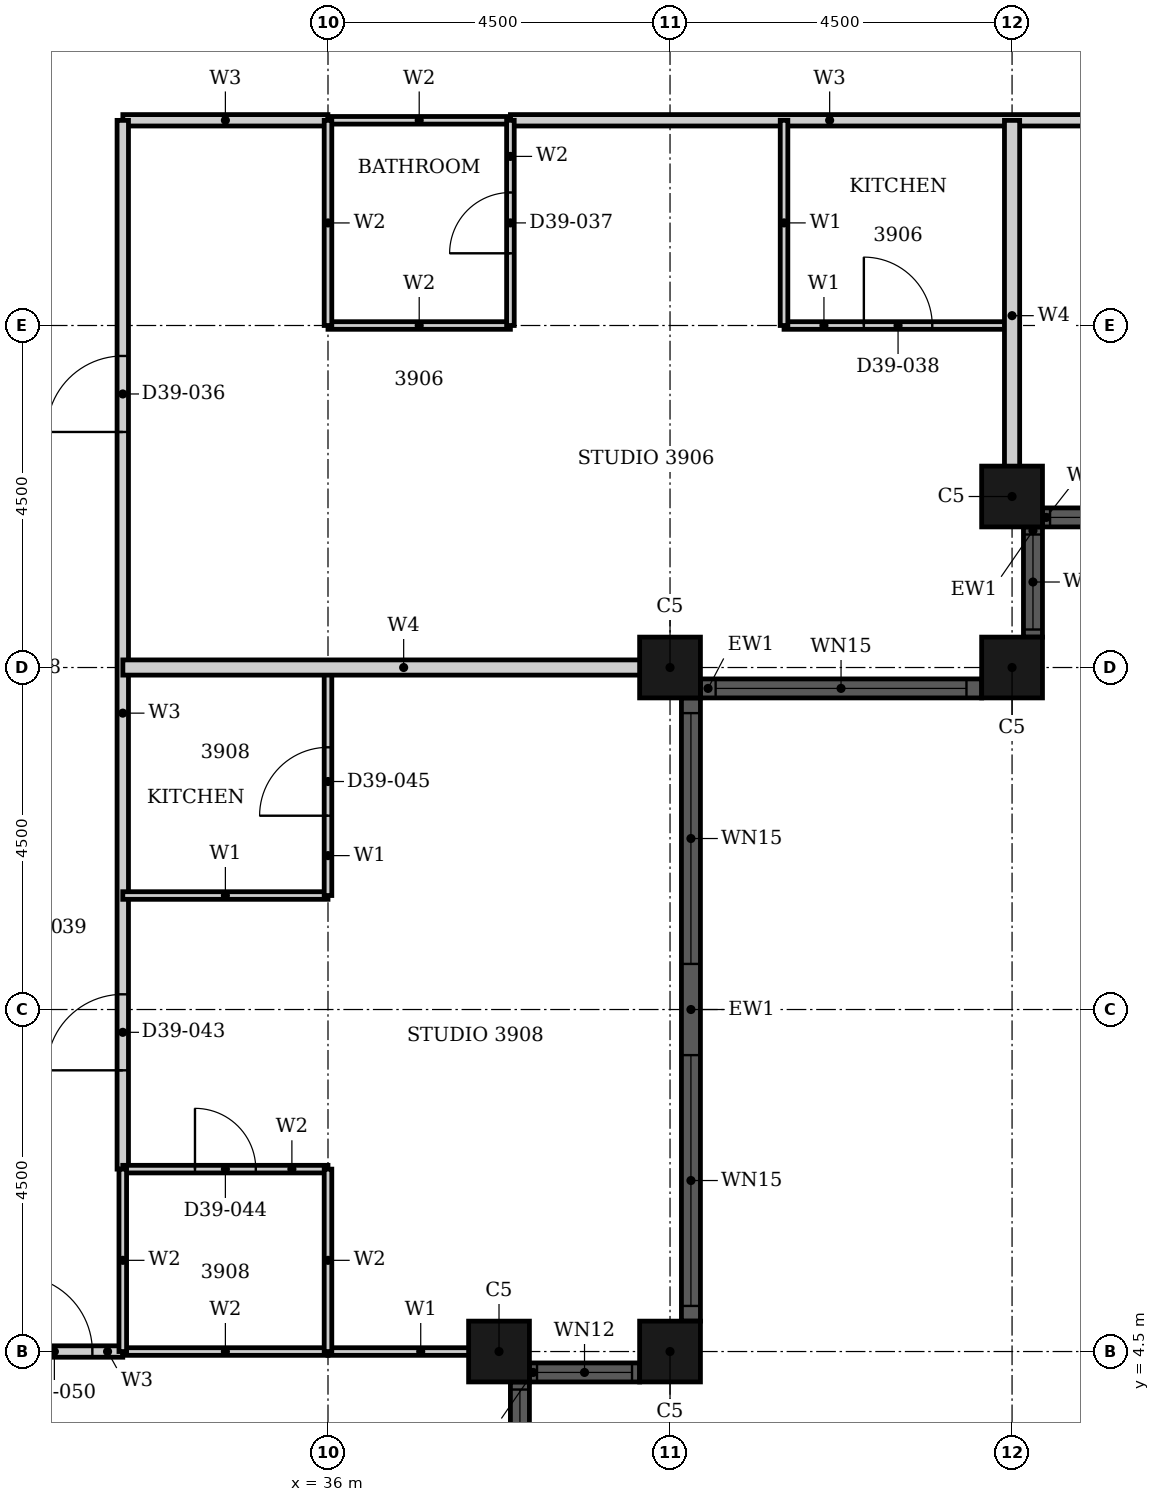
"""IFC4 building model, lengths in metres.
Left out: names, types, materials, properties, quantities, classifications, styles, units other than length and angle.
Written with IfcOpenShell. Run it as: python <this file> out.ifc"""

import sys

from ifc_helpers import new_model, si_unit, direction, frame, frame_2d, origin, origin_2d, place, context, subcontext, project, spatial, rectangle, hollow_rectangle, extrude, element, fill, save


model = new_model("IFC4")
c1 = context("Model", 3, precision=1e-05, world=origin(), true_north=direction((0.0, 1.0)))
c2 = subcontext(c1, "Body", "Model", "MODEL_VIEW")
j1 = project(units=[si_unit("LENGTHUNIT", "METRE"), si_unit("PLANEANGLEUNIT", "RADIAN")], contexts=[c1])
p1 = place(None, origin())
s1 = spatial("IfcSite", under=j1, at=p1, CompositionType="ELEMENT")
p2 = place(p1, origin())
s2 = spatial("IfcBuilding", under=s1, at=p2, CompositionType="ELEMENT")
p3 = place(p2, frame((0.0, 0.0, 158.0)))
s3 = spatial("IfcBuildingStorey", under=s2, at=p3, CompositionType="ELEMENT", Elevation=158.0)
for number, where, z_axis, x_axis in (
    (1, (38.25, 4.5, 0.0), (0.0, 0.0, 1.0), (1.0, 0.0, 0.0)),
    (2, (40.5, 4.5, 0.0), (0.0, 0.0, 1.0), (1.0, 0.0, 0.0)),
    (3, (40.5, 13.5, 0.0), (0.0, 0.0, 1.0), (1.0, 0.0, 0.0)),
    (4, (45.0, 13.5, 0.0), (0.0, 0.0, 1.0), (1.0, 0.0, 0.0)),
    (5, (45.0, 15.75, 0.0), (0.0, 0.0, 1.0), (1.0, 0.0, 0.0)),
):
    element("IfcColumn", number, at=place(p3, frame(where, z_axis=z_axis, x_axis=x_axis)), inside=s3, PredefinedType="COLUMN", context=c2, shape_type="SweptSolid", body=[
        extrude(hollow_rectangle(XDim=0.8, YDim=0.8, WallThickness=0.025, at=origin_2d()), origin(), (0.0, 0.0, 1.0), 3.7),
    ])
p4 = place(p3, frame((38.525, 2.65, 0.0), z_axis=(0.0, 0.0, 1.0), x_axis=(0.0, 1.0, 0.0)))
e6 = element("IfcWall", 6, at=p4, inside=s3, PredefinedType="SOLIDWALL", context=c2, shape_type="SweptSolid", body=[
    extrude(rectangle(XDim=1.45, YDim=0.25, at=frame_2d((0.725, 0.0))), origin(), (0.0, 0.0, 1.0), 3.7),
])
p5 = place(p4, frame((0.1, 0.0, 0.9)))
e7 = element("IfcOpeningElement", 7, at=p5, cuts=e6, PredefinedType="OPENING", context=c2, shape_type="SweptSolid", body=[
    extrude(rectangle(XDim=1.25, YDim=1.85, at=frame_2d((0.625, 0.925))), frame((0.0, 0.135, 0.0), z_axis=(0.0, -1.0, 0.0), x_axis=(1.0, 0.0, 0.0)), (0.0, 0.0, 1.0), 0.27),
])
p6 = place(p3, frame((38.65, 4.225, 0.0), z_axis=(0.0, 0.0, 1.0), x_axis=(1.0, 0.0, 0.0)))
e8 = element("IfcWall", 8, at=p6, inside=s3, PredefinedType="SOLIDWALL", context=c2, shape_type="SweptSolid", body=[
    extrude(rectangle(XDim=1.45, YDim=0.25, at=frame_2d((0.725, 0.0))), origin(), (0.0, 0.0, 1.0), 3.7),
])
p7 = place(p6, frame((0.1, 0.0, 0.9)))
e9 = element("IfcOpeningElement", 9, at=p7, cuts=e8, PredefinedType="OPENING", context=c2, shape_type="SweptSolid", body=[
    extrude(rectangle(XDim=1.25, YDim=2.08, at=frame_2d((0.625, 1.04))), frame((0.0, 0.135, 0.0), z_axis=(0.0, -1.0, 0.0), x_axis=(1.0, 0.0, 0.0)), (0.0, 0.0, 1.0), 0.27),
])
p8 = place(p3, frame((40.775, 4.9, 0.0), z_axis=(0.0, 0.0, 1.0), x_axis=(0.0, 1.0, 0.0)))
e10 = element("IfcWall", 10, at=p8, inside=s3, PredefinedType="SOLIDWALL", context=c2, shape_type="SweptSolid", body=[
    extrude(rectangle(XDim=8.2, YDim=0.25, at=frame_2d((4.1, 0.0))), origin(), (0.0, 0.0, 1.0), 3.7),
])
p9 = place(p8, frame((0.2, 0.0, 0.45)))
e11 = element("IfcOpeningElement", 11, at=p9, cuts=e10, PredefinedType="OPENING", context=c2, shape_type="SweptSolid", body=[
    extrude(rectangle(XDim=3.3, YDim=2.3, at=frame_2d((1.65, 1.15))), frame((0.0, 0.135, 0.0), z_axis=(0.0, -1.0, 0.0), x_axis=(1.0, 0.0, 0.0)), (0.0, 0.0, 1.0), 0.27),
])
p10 = place(p8, frame((4.7, 0.0, 0.45)))
e12 = element("IfcOpeningElement", 12, at=p10, cuts=e10, PredefinedType="OPENING", context=c2, shape_type="SweptSolid", body=[
    extrude(rectangle(XDim=3.3, YDim=2.3, at=frame_2d((1.65, 1.15))), frame((0.0, 0.135, 0.0), z_axis=(0.0, -1.0, 0.0), x_axis=(1.0, 0.0, 0.0)), (0.0, 0.0, 1.0), 0.27),
])
p11 = place(p3, frame((40.9, 13.225, 0.0), z_axis=(0.0, 0.0, 1.0), x_axis=(1.0, 0.0, 0.0)))
e13 = element("IfcWall", 13, at=p11, inside=s3, PredefinedType="SOLIDWALL", context=c2, shape_type="SweptSolid", body=[
    extrude(rectangle(XDim=3.7, YDim=0.25, at=frame_2d((1.85, 0.0))), origin(), (0.0, 0.0, 1.0), 3.7),
])
p12 = place(p11, frame((0.2, 0.0, 0.45)))
e14 = element("IfcOpeningElement", 14, at=p12, cuts=e13, PredefinedType="OPENING", context=c2, shape_type="SweptSolid", body=[
    extrude(rectangle(XDim=3.3, YDim=2.3, at=frame_2d((1.65, 1.15))), frame((0.0, 0.135, 0.0), z_axis=(0.0, -1.0, 0.0), x_axis=(1.0, 0.0, 0.0)), (0.0, 0.0, 1.0), 0.27),
])
p13 = place(p3, frame((45.275, 13.9, 0.0), z_axis=(0.0, 0.0, 1.0), x_axis=(0.0, 1.0, 0.0)))
e15 = element("IfcWall", 15, at=p13, inside=s3, PredefinedType="SOLIDWALL", context=c2, shape_type="SweptSolid", body=[
    extrude(rectangle(XDim=1.45, YDim=0.25, at=frame_2d((0.725, 0.0))), origin(), (0.0, 0.0, 1.0), 3.7),
])
p14 = place(p13, frame((0.1, 0.0, 0.9)))
e16 = element("IfcOpeningElement", 16, at=p14, cuts=e15, PredefinedType="OPENING", context=c2, shape_type="SweptSolid", body=[
    extrude(rectangle(XDim=1.25, YDim=1.85, at=frame_2d((0.625, 0.925))), frame((0.0, 0.135, 0.0), z_axis=(0.0, -1.0, 0.0), x_axis=(1.0, 0.0, 0.0)), (0.0, 0.0, 1.0), 0.27),
])
p15 = place(p3, frame((45.4, 15.475, 0.0), z_axis=(0.0, 0.0, 1.0), x_axis=(1.0, 0.0, 0.0)))
e17 = element("IfcWall", 17, at=p15, inside=s3, PredefinedType="SOLIDWALL", context=c2, shape_type="SweptSolid", body=[
    extrude(rectangle(XDim=1.45, YDim=0.25, at=frame_2d((0.725, 0.0))), origin(), (0.0, 0.0, 1.0), 3.7),
])
p16 = place(p15, frame((0.1, 0.0, 0.9)))
e18 = element("IfcOpeningElement", 18, at=p16, cuts=e17, PredefinedType="OPENING", context=c2, shape_type="SweptSolid", body=[
    extrude(rectangle(XDim=1.25, YDim=1.85, at=frame_2d((0.625, 0.925))), frame((0.0, 0.135, 0.0), z_axis=(0.0, -1.0, 0.0), x_axis=(1.0, 0.0, 0.0)), (0.0, 0.0, 1.0), 0.27),
])
p17 = place(p3, frame((33.301, 20.7, 0.0), z_axis=(0.0, 0.0, 1.0), x_axis=(1.0, 0.0, 0.0)))
e19 = element("IfcWall", 19, at=p17, inside=s3, PredefinedType="PARTITIONING", context=c2, shape_type="SweptSolid", body=[
    extrude(rectangle(XDim=2.698, YDim=0.15, at=frame_2d((1.349, 0.0))), origin(), (0.0, 0.0, 1.0), 3.4),
])
p18 = place(p3, frame((38.4, 20.7, 0.0), z_axis=(0.0, 0.0, 1.0), x_axis=(1.0, 0.0, 0.0)))
e20 = element("IfcWall", 20, at=p18, inside=s3, PredefinedType="PARTITIONING", context=c2, shape_type="SweptSolid", body=[
    extrude(rectangle(XDim=8.4, YDim=0.15, at=frame_2d((4.2, 0.0))), origin(), (0.0, 0.0, 1.0), 3.4),
])
p19 = place(p3, frame((31.5, 4.5, 0.0), z_axis=(0.0, 0.0, 1.0), x_axis=(1.0, 0.0, 0.0)))
e21 = element("IfcWall", 21, at=p19, inside=s3, PredefinedType="PARTITIONING", context=c2, shape_type="SweptSolid", body=[
    extrude(rectangle(XDim=1.8, YDim=0.15, at=frame_2d((0.9, 0.0))), origin(), (0.0, 0.0, 1.0), 3.4),
])
p20 = place(p19, frame((0.4, 0.0, 0.0)))
e22 = element("IfcOpeningElement", 22, at=p20, cuts=e21, PredefinedType="OPENING", context=c2, shape_type="SweptSolid", body=[
    extrude(rectangle(XDim=1.0, YDim=2.1, at=frame_2d((0.5, 1.05))), frame((0.0, 0.085, 0.0), z_axis=(0.0, -1.0, 0.0), x_axis=(1.0, 0.0, 0.0)), (0.0, 0.0, 1.0), 0.17),
])
p21 = place(p3, frame((33.3, 6.9, 0.0), z_axis=(0.0, 0.0, 1.0), x_axis=(0.0, 1.0, 0.0)))
e23 = element("IfcWall", 23, at=p21, inside=s3, PredefinedType="PARTITIONING", context=c2, shape_type="SweptSolid", body=[
    extrude(rectangle(XDim=13.799, YDim=0.15, at=frame_2d((6.899, 0.0))), origin(), (0.0, 0.0, 1.0), 3.4),
])
p22 = place(p21, frame((9.699, 0.0, 0.0)))
e24 = element("IfcOpeningElement", 24, at=p22, cuts=e23, PredefinedType="OPENING", context=c2, shape_type="SweptSolid", body=[
    extrude(rectangle(XDim=1.0, YDim=2.2, at=frame_2d((0.5, 1.1))), frame((0.0, 0.085, 0.0), z_axis=(0.0, -1.0, 0.0), x_axis=(1.0, 0.0, 0.0)), (0.0, 0.0, 1.0), 0.17),
])
p23 = place(p21, frame((1.3, 0.0, 0.0)))
e25 = element("IfcOpeningElement", 25, at=p23, cuts=e23, PredefinedType="OPENING", context=c2, shape_type="SweptSolid", body=[
    extrude(rectangle(XDim=1.0, YDim=2.2, at=frame_2d((0.5, 1.1))), frame((0.0, 0.085, 0.0), z_axis=(0.0, -1.0, 0.0), x_axis=(1.0, 0.0, 0.0)), (0.0, 0.0, 1.0), 0.17),
])
p24 = place(p3, frame((33.3, 10.5, 0.0), z_axis=(0.0, 0.0, 1.0), x_axis=(1.0, 0.0, 0.0)))
e26 = element("IfcWall", 26, at=p24, inside=s3, PredefinedType="PARTITIONING", context=c2, shape_type="SweptSolid", body=[
    extrude(rectangle(XDim=2.7, YDim=0.1, at=frame_2d((1.35, 0.0))), origin(), (0.0, 0.0, 1.0), 3.4),
])
p25 = place(p3, frame((42.0, 18.0, 0.0), z_axis=(0.0, 0.0, 1.0), x_axis=(1.0, 0.0, 0.0)))
e27 = element("IfcWall", 27, at=p25, inside=s3, PredefinedType="PARTITIONING", context=c2, shape_type="SweptSolid", body=[
    extrude(rectangle(XDim=3.0, YDim=0.1, at=frame_2d((1.5, 0.0))), origin(), (0.0, 0.0, 1.0), 3.4),
])
p26 = place(p25, frame((1.05, 0.0, 0.0)))
e28 = element("IfcOpeningElement", 28, at=p26, cuts=e27, PredefinedType="OPENING", context=c2, shape_type="SweptSolid", body=[
    extrude(rectangle(XDim=0.9, YDim=2.1, at=frame_2d((0.45, 1.05))), frame((0.0, 0.06, 0.0), z_axis=(0.0, -1.0, 0.0), x_axis=(1.0, 0.0, 0.0)), (0.0, 0.0, 1.0), 0.12),
])
p27 = place(p3, frame((36.0, 4.5, 0.0), z_axis=(0.0, 0.0, 1.0), x_axis=(1.0, 0.0, 0.0)))
e29 = element("IfcWall", 29, at=p27, inside=s3, PredefinedType="PARTITIONING", context=c2, shape_type="SweptSolid", body=[
    extrude(rectangle(XDim=2.44, YDim=0.1, at=frame_2d((1.22, 0.0))), origin(), (0.0, 0.0, 1.0), 3.4),
])
p28 = place(p3, frame((36.0, 10.5, 0.0), z_axis=(0.0, 0.0, 1.0), x_axis=(0.0, 1.0, 0.0)))
e30 = element("IfcWall", 30, at=p28, inside=s3, PredefinedType="PARTITIONING", context=c2, shape_type="SweptSolid", body=[
    extrude(rectangle(XDim=3.0, YDim=0.1, at=frame_2d((1.5, 0.0))), origin(), (0.0, 0.0, 1.0), 2.68),
])
p29 = place(p28, frame((1.05, 0.0, 0.0)))
e31 = element("IfcOpeningElement", 31, at=p29, cuts=e30, PredefinedType="OPENING", context=c2, shape_type="SweptSolid", body=[
    extrude(rectangle(XDim=0.9, YDim=2.1, at=frame_2d((0.45, 1.05))), frame((0.0, 0.06, 0.0), z_axis=(0.0, -1.0, 0.0), x_axis=(1.0, 0.0, 0.0)), (0.0, 0.0, 1.0), 0.12),
])
p30 = place(p3, frame((42.0, 18.0, 0.0), z_axis=(0.0, 0.0, 1.0), x_axis=(0.0, 1.0, 0.0)))
e32 = element("IfcWall", 32, at=p30, inside=s3, PredefinedType="PARTITIONING", context=c2, shape_type="SweptSolid", body=[
    extrude(rectangle(XDim=2.7, YDim=0.1, at=frame_2d((1.35, 0.0))), origin(), (0.0, 0.0, 1.0), 3.4),
])
p31 = place(p3, frame((33.301, 13.5, 0.0), z_axis=(0.0, 0.0, 1.0), x_axis=(1.0, 0.0, 0.0)))
e33 = element("IfcWall", 33, at=p31, inside=s3, PredefinedType="PARTITIONING", context=c2, shape_type="SweptSolid", body=[
    extrude(rectangle(XDim=7.389, YDim=0.2, at=frame_2d((3.694, 0.0))), origin(), (0.0, 0.0, 1.0), 2.48),
])
p32 = place(p3, frame((45.0, 15.56, 0.0), z_axis=(0.0, 0.0, 1.0), x_axis=(0.0, 1.0, 0.0)))
e34 = element("IfcWall", 34, at=p32, inside=s3, PredefinedType="PARTITIONING", context=c2, shape_type="SweptSolid", body=[
    extrude(rectangle(XDim=5.139, YDim=0.2, at=frame_2d((2.569, 0.0))), origin(), (0.0, 0.0, 1.0), 3.4),
])
for number, where, z_axis, x_axis in (
    (35, (36.0, 18.0, 0.0), (0.0, 0.0, 1.0), (1.0, 0.0, 0.0)),
    (36, (36.0, 20.7, 0.0), (0.0, 0.0, 1.0), (1.0, 0.0, 0.0)),
):
    element("IfcWall", number, at=place(p3, frame(where, z_axis=z_axis, x_axis=x_axis)), inside=s3, PredefinedType="PARTITIONING", context=c2, shape_type="SweptSolid", body=[
        extrude(rectangle(XDim=2.4, YDim=0.1, at=frame_2d((1.2, 0.0))), origin(), (0.0, 0.0, 1.0), 3.4),
    ])
p33 = place(p3, frame((33.3, 4.5, 0.0), z_axis=(0.0, 0.0, 1.0), x_axis=(1.0, 0.0, 0.0)))
e37 = element("IfcWall", 37, at=p33, inside=s3, PredefinedType="PARTITIONING", context=c2, shape_type="SweptSolid", body=[
    extrude(rectangle(XDim=2.7, YDim=0.1, at=frame_2d((1.35, 0.0))), origin(), (0.0, 0.0, 1.0), 3.4),
])
p34 = place(p3, frame((33.3, 6.9, 0.0), z_axis=(0.0, 0.0, 1.0), x_axis=(1.0, 0.0, 0.0)))
e38 = element("IfcWall", 38, at=p34, inside=s3, PredefinedType="PARTITIONING", context=c2, shape_type="SweptSolid", body=[
    extrude(rectangle(XDim=2.7, YDim=0.1, at=frame_2d((1.35, 0.0))), origin(), (0.0, 0.0, 1.0), 3.4),
])
p35 = place(p34, frame((0.95, 0.0, 0.0)))
e39 = element("IfcOpeningElement", 39, at=p35, cuts=e38, PredefinedType="OPENING", context=c2, shape_type="SweptSolid", body=[
    extrude(rectangle(XDim=0.8, YDim=2.1, at=frame_2d((0.4, 1.05))), frame((0.0, 0.06, 0.0), z_axis=(0.0, -1.0, 0.0), x_axis=(1.0, 0.0, 0.0)), (0.0, 0.0, 1.0), 0.12),
])
p36 = place(p3, frame((33.3, 4.5, 0.0), z_axis=(0.0, 0.0, 1.0), x_axis=(0.0, 1.0, 0.0)))
e40 = element("IfcWall", 40, at=p36, inside=s3, PredefinedType="PARTITIONING", context=c2, shape_type="SweptSolid", body=[
    extrude(rectangle(XDim=2.4, YDim=0.1, at=frame_2d((1.2, 0.0))), origin(), (0.0, 0.0, 1.0), 3.4),
])
p37 = place(p3, frame((36.0, 4.5, 0.0), z_axis=(0.0, 0.0, 1.0), x_axis=(0.0, 1.0, 0.0)))
e41 = element("IfcWall", 41, at=p37, inside=s3, PredefinedType="PARTITIONING", context=c2, shape_type="SweptSolid", body=[
    extrude(rectangle(XDim=2.4, YDim=0.1, at=frame_2d((1.2, 0.0))), origin(), (0.0, 0.0, 1.0), 2.68),
])
p38 = place(p3, frame((36.0, 18.0, 0.0), z_axis=(0.0, 0.0, 1.0), x_axis=(0.0, 1.0, 0.0)))
e42 = element("IfcWall", 42, at=p38, inside=s3, PredefinedType="PARTITIONING", context=c2, shape_type="SweptSolid", body=[
    extrude(rectangle(XDim=2.699, YDim=0.1, at=frame_2d((1.35, 0.0))), origin(), (0.0, 0.0, 1.0), 3.4),
])
p39 = place(p3, frame((38.4, 18.0, 0.0), z_axis=(0.0, 0.0, 1.0), x_axis=(0.0, 1.0, 0.0)))
e43 = element("IfcWall", 43, at=p39, inside=s3, PredefinedType="PARTITIONING", context=c2, shape_type="SweptSolid", body=[
    extrude(rectangle(XDim=2.7, YDim=0.1, at=frame_2d((1.35, 0.0))), origin(), (0.0, 0.0, 1.0), 3.4),
])
p40 = place(p39, frame((0.95, 0.0, 0.0)))
e44 = element("IfcOpeningElement", 44, at=p40, cuts=e43, PredefinedType="OPENING", context=c2, shape_type="SweptSolid", body=[
    extrude(rectangle(XDim=0.8, YDim=2.1, at=frame_2d((0.4, 1.05))), frame((0.0, 0.06, 0.0), z_axis=(0.0, -1.0, 0.0), x_axis=(1.0, 0.0, 0.0)), (0.0, 0.0, 1.0), 0.12),
])
p41 = place(p5, origin())
e45 = element("IfcWindow", 45, at=p41, inside=s3, PartitioningType="SINGLE_PANEL", PredefinedType="WINDOW", context=c2, shape_type="SweptSolid", body=[
    extrude(rectangle(XDim=1.25, YDim=1.85, at=frame_2d((0.625, 0.925))), frame((0.0, 0.03, 0.0), z_axis=(0.0, -1.0, 0.0), x_axis=(1.0, 0.0, 0.0)), (0.0, 0.0, 1.0), 0.06),
])
fill(e7, e45)
p42 = place(p7, origin())
e46 = element("IfcWindow", 46, at=p42, inside=s3, PartitioningType="SINGLE_PANEL", PredefinedType="WINDOW", context=c2, shape_type="SweptSolid", body=[
    extrude(rectangle(XDim=1.25, YDim=2.08, at=frame_2d((0.625, 1.04))), frame((0.0, 0.03, 0.0), z_axis=(0.0, -1.0, 0.0), x_axis=(1.0, 0.0, 0.0)), (0.0, 0.0, 1.0), 0.06),
])
fill(e9, e46)
p43 = place(p9, origin())
e47 = element("IfcWindow", 47, at=p43, inside=s3, PartitioningType="SINGLE_PANEL", PredefinedType="WINDOW", context=c2, shape_type="SweptSolid", body=[
    extrude(rectangle(XDim=3.3, YDim=2.3, at=frame_2d((1.65, 1.15))), frame((0.0, 0.03, 0.0), z_axis=(0.0, -1.0, 0.0), x_axis=(1.0, 0.0, 0.0)), (0.0, 0.0, 1.0), 0.06),
])
fill(e11, e47)
p44 = place(p10, origin())
e48 = element("IfcWindow", 48, at=p44, inside=s3, PartitioningType="SINGLE_PANEL", PredefinedType="WINDOW", context=c2, shape_type="SweptSolid", body=[
    extrude(rectangle(XDim=3.3, YDim=2.3, at=frame_2d((1.65, 1.15))), frame((0.0, 0.03, 0.0), z_axis=(0.0, -1.0, 0.0), x_axis=(1.0, 0.0, 0.0)), (0.0, 0.0, 1.0), 0.06),
])
fill(e12, e48)
p45 = place(p12, origin())
e49 = element("IfcWindow", 49, at=p45, inside=s3, PartitioningType="SINGLE_PANEL", PredefinedType="WINDOW", context=c2, shape_type="SweptSolid", body=[
    extrude(rectangle(XDim=3.3, YDim=2.3, at=frame_2d((1.65, 1.15))), frame((0.0, 0.03, 0.0), z_axis=(0.0, -1.0, 0.0), x_axis=(1.0, 0.0, 0.0)), (0.0, 0.0, 1.0), 0.06),
])
fill(e14, e49)
p46 = place(p14, origin())
e50 = element("IfcWindow", 50, at=p46, inside=s3, PartitioningType="SINGLE_PANEL", PredefinedType="WINDOW", context=c2, shape_type="SweptSolid", body=[
    extrude(rectangle(XDim=1.25, YDim=1.85, at=frame_2d((0.625, 0.925))), frame((0.0, 0.03, 0.0), z_axis=(0.0, -1.0, 0.0), x_axis=(1.0, 0.0, 0.0)), (0.0, 0.0, 1.0), 0.06),
])
fill(e16, e50)
p47 = place(p16, origin())
e51 = element("IfcWindow", 51, at=p47, inside=s3, PartitioningType="SINGLE_PANEL", PredefinedType="WINDOW", context=c2, shape_type="SweptSolid", body=[
    extrude(rectangle(XDim=1.25, YDim=1.85, at=frame_2d((0.625, 0.925))), frame((0.0, 0.03, 0.0), z_axis=(0.0, -1.0, 0.0), x_axis=(1.0, 0.0, 0.0)), (0.0, 0.0, 1.0), 0.06),
])
fill(e18, e51)
p48 = place(p22, origin())
e52 = element("IfcDoor", 52, at=p48, inside=s3, OperationType="SINGLE_SWING_RIGHT", PredefinedType="DOOR", context=c2, shape_type="SweptSolid", body=[
    extrude(rectangle(XDim=1.0, YDim=2.2, at=frame_2d((0.5, 1.1))), frame((0.0, 0.025, 0.0), z_axis=(0.0, -1.0, 0.0), x_axis=(1.0, 0.0, 0.0)), (0.0, 0.0, 1.0), 0.05),
])
fill(e24, e52)
p49 = place(p40, origin())
e53 = element("IfcDoor", 53, at=p49, inside=s3, OperationType="SINGLE_SWING_RIGHT", PredefinedType="DOOR", context=c2, shape_type="SweptSolid", body=[
    extrude(rectangle(XDim=0.8, YDim=2.1, at=frame_2d((0.4, 1.05))), frame((0.0, 0.025, 0.0), z_axis=(0.0, -1.0, 0.0), x_axis=(1.0, 0.0, 0.0)), (0.0, 0.0, 1.0), 0.05),
])
fill(e44, e53)
p50 = place(p26, origin())
e54 = element("IfcDoor", 54, at=p50, inside=s3, OperationType="SINGLE_SWING_RIGHT", PredefinedType="DOOR", context=c2, shape_type="SweptSolid", body=[
    extrude(rectangle(XDim=0.9, YDim=2.1, at=frame_2d((0.45, 1.05))), frame((0.0, 0.025, 0.0), z_axis=(0.0, -1.0, 0.0), x_axis=(1.0, 0.0, 0.0)), (0.0, 0.0, 1.0), 0.05),
])
fill(e28, e54)
p51 = place(p23, origin())
e55 = element("IfcDoor", 55, at=p51, inside=s3, OperationType="SINGLE_SWING_LEFT", PredefinedType="DOOR", context=c2, shape_type="SweptSolid", body=[
    extrude(rectangle(XDim=1.0, YDim=2.2, at=frame_2d((0.5, 1.1))), frame((0.0, 0.025, 0.0), z_axis=(0.0, -1.0, 0.0), x_axis=(1.0, 0.0, 0.0)), (0.0, 0.0, 1.0), 0.05),
])
fill(e25, e55)
p52 = place(p35, origin())
e56 = element("IfcDoor", 56, at=p52, inside=s3, OperationType="SINGLE_SWING_LEFT", PredefinedType="DOOR", context=c2, shape_type="SweptSolid", body=[
    extrude(rectangle(XDim=0.8, YDim=2.1, at=frame_2d((0.4, 1.05))), frame((0.0, 0.025, 0.0), z_axis=(0.0, -1.0, 0.0), x_axis=(1.0, 0.0, 0.0)), (0.0, 0.0, 1.0), 0.05),
])
fill(e39, e56)
p53 = place(p29, origin())
e57 = element("IfcDoor", 57, at=p53, inside=s3, OperationType="SINGLE_SWING_RIGHT", PredefinedType="DOOR", context=c2, shape_type="SweptSolid", body=[
    extrude(rectangle(XDim=0.9, YDim=2.1, at=frame_2d((0.45, 1.05))), frame((0.0, 0.025, 0.0), z_axis=(0.0, -1.0, 0.0), x_axis=(1.0, 0.0, 0.0)), (0.0, 0.0, 1.0), 0.05),
])
fill(e31, e57)
p54 = place(p20, origin())
e58 = element("IfcDoor", 58, at=p54, inside=s3, OperationType="SINGLE_SWING_LEFT", PredefinedType="DOOR", context=c2, shape_type="SweptSolid", body=[
    extrude(rectangle(XDim=1.0, YDim=2.1, at=frame_2d((0.5, 1.05))), frame((0.0, 0.025, 0.0), z_axis=(0.0, -1.0, 0.0), x_axis=(1.0, 0.0, 0.0)), (0.0, 0.0, 1.0), 0.05),
])
fill(e22, e58)
save(model, sys.argv[1])
